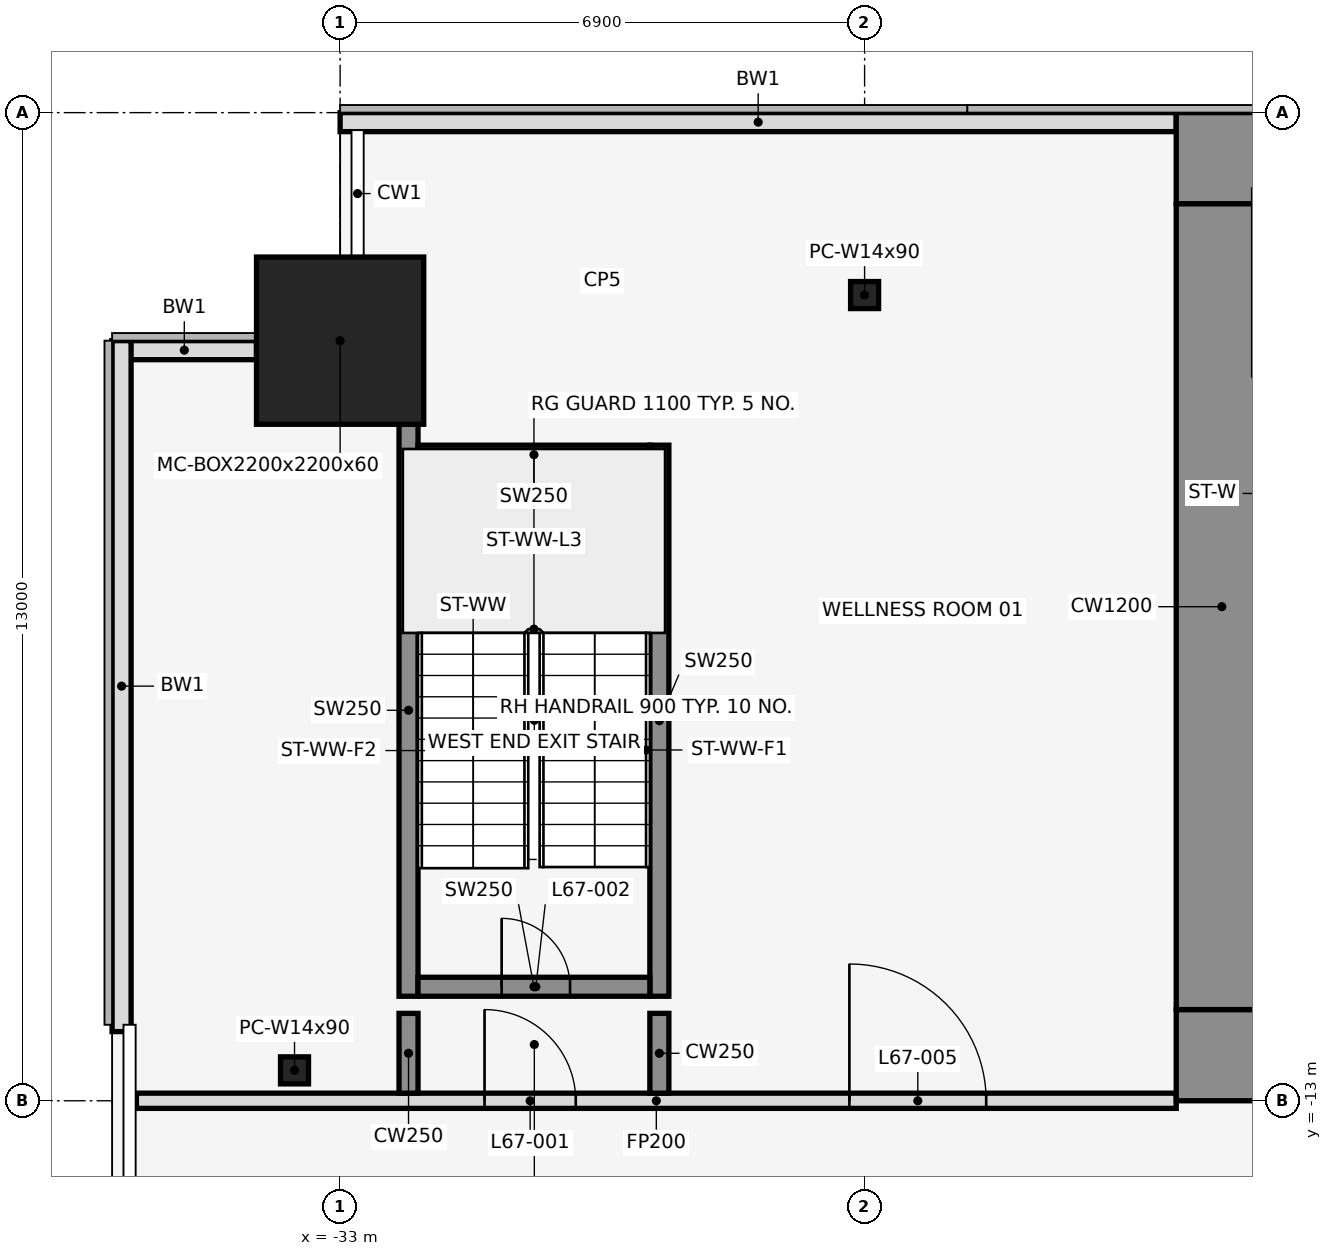
"""IFC4 building model, lengths in metres.
Left out: names, types, materials, properties, quantities, classifications, styles, units other than length and angle.
Written with IfcOpenShell. Run it as: python <this file> out.ifc"""

import sys

from ifc_helpers import new_model, si_unit, direction, frame, frame_2d, origin, origin_2d, place, context, subcontext, project, spatial, rectangle, hollow_rectangle, i_section, extrude, element, fill, save


model = new_model("IFC4")
c1 = context("Model", 3, precision=1e-05, world=origin(), true_north=direction((0.0, 1.0)))
c2 = subcontext(c1, "Body", "Model", "MODEL_VIEW")
j1 = project(units=[si_unit("LENGTHUNIT", "METRE"), si_unit("PLANEANGLEUNIT", "RADIAN")], contexts=[c1])
p1 = place(None, origin())
s1 = spatial("IfcSite", under=j1, at=p1, CompositionType="ELEMENT")
p2 = place(p1, origin())
s2 = spatial("IfcBuilding", under=s1, at=p2, CompositionType="ELEMENT")
p3 = place(p2, frame((0.0, 0.0, 297.5)))
s3 = spatial("IfcBuildingStorey", under=s2, at=p3, CompositionType="ELEMENT", Elevation=297.5)
p4 = place(p3, frame((-33.0, -3.0, 0.0), z_axis=(0.0, 0.0, 1.0), x_axis=(1.0, 0.0, 0.0)))
e1 = element("IfcColumn", 1, at=p4, inside=s3, PredefinedType="COLUMN", context=c2, shape_type="SweptSolid", body=[
    extrude(hollow_rectangle(XDim=2.2, YDim=2.2, WallThickness=0.06, at=origin_2d()), origin(), (0.0, 0.0, 1.0), 4.5),
])
for number, where, z_axis, x_axis in (
    (2, (-26.1, -2.4, 0.0), (0.0, 0.0, 1.0), (1.0, 0.0, 0.0)),
    (3, (-33.6, -12.6, 0.0), (0.0, 0.0, 1.0), (1.0, 0.0, 0.0)),
):
    element("IfcColumn", number, at=place(p3, frame(where, z_axis=z_axis, x_axis=x_axis)), inside=s3, PredefinedType="COLUMN", context=c2, shape_type="SweptSolid", body=[
        extrude(i_section(OverallWidth=0.368, OverallDepth=0.356, WebThickness=0.011, FlangeThickness=0.018, at=origin_2d()), origin(), (0.0, 0.0, 1.0), 4.5),
    ])
p5 = place(p3, frame((-22.0, -0.125, 0.0), z_axis=(0.0, 0.0, 1.0), x_axis=(-1.0, 0.0, 0.0)))
e4 = element("IfcWall", 4, at=p5, inside=s3, PredefinedType="STANDARD", context=c2, shape_type="SweptSolid", body=[
    extrude(rectangle(XDim=11.0, YDim=0.25, at=frame_2d((5.5, 0.0))), origin(), (0.0, 0.0, 1.0), 4.35),
])
p6 = place(p3, frame((-34.1, -3.125, 0.0), z_axis=(0.0, 0.0, 1.0), x_axis=(-1.0, 0.0, 0.0)))
e5 = element("IfcWall", 5, at=p6, inside=s3, PredefinedType="STANDARD", context=c2, shape_type="SweptSolid", body=[
    extrude(rectangle(XDim=1.9, YDim=0.25, at=frame_2d((0.95, 0.0))), origin(), (0.0, 0.0, 1.0), 4.35),
])
p7 = place(p3, frame((-35.875, -3.0, 0.0), z_axis=(0.0, 0.0, 1.0), x_axis=(0.0, -1.0, 0.0)))
e6 = element("IfcWall", 6, at=p7, inside=s3, PredefinedType="STANDARD", context=c2, shape_type="SweptSolid", body=[
    extrude(rectangle(XDim=9.09, YDim=0.25, at=frame_2d((4.545, 0.0))), origin(), (0.0, 0.0, 1.0), 4.35),
])
p8 = place(p3, frame((-32.1, -11.625, 0.0), z_axis=(0.0, 0.0, 1.0), x_axis=(0.0, 1.0, 0.0)))
e7 = element("IfcWall", 7, at=p8, inside=s3, PredefinedType="SHEAR", context=c2, shape_type="SweptSolid", body=[
    extrude(rectangle(XDim=7.525, YDim=0.25, at=frame_2d((3.762, 0.0))), origin(), (0.0, 0.0, 1.0), 4.5),
])
p9 = place(p3, frame((-28.8, -11.625, 0.0), z_axis=(0.0, 0.0, 1.0), x_axis=(0.0, 1.0, 0.0)))
e8 = element("IfcWall", 8, at=p9, inside=s3, PredefinedType="SHEAR", context=c2, shape_type="SweptSolid", body=[
    extrude(rectangle(XDim=7.25, YDim=0.25, at=frame_2d((3.625, 0.0))), origin(), (0.0, 0.0, 1.0), 4.5),
])
p10 = place(p3, frame((-31.975, -11.5, 0.0), z_axis=(0.0, 0.0, 1.0), x_axis=(1.0, 0.0, 0.0)))
e9 = element("IfcWall", 9, at=p10, inside=s3, PredefinedType="SHEAR", context=c2, shape_type="SweptSolid", body=[
    extrude(rectangle(XDim=3.05, YDim=0.25, at=frame_2d((1.525, 0.0))), origin(), (0.0, 0.0, 1.0), 4.5),
])
p11 = place(p10, frame((1.1, 0.0, 0.0)))
e10 = element("IfcOpeningElement", 10, at=p11, cuts=e9, PredefinedType="OPENING", context=c2, shape_type="SweptSolid", body=[
    extrude(rectangle(XDim=0.9, YDim=2.1, at=frame_2d((0.45, 1.05))), frame((0.0, 0.137, 0.0), z_axis=(0.0, -1.0, 0.0), x_axis=(1.0, 0.0, 0.0)), (0.0, 0.0, 1.0), 0.274),
])
p12 = place(p3, frame((-31.975, -4.5, 0.0), z_axis=(0.0, 0.0, 1.0), x_axis=(1.0, 0.0, 0.0)))
e11 = element("IfcWall", 11, at=p12, inside=s3, PredefinedType="SHEAR", context=c2, shape_type="SweptSolid", body=[
    extrude(rectangle(XDim=3.05, YDim=0.25, at=frame_2d((1.525, 0.0))), origin(), (0.0, 0.0, 1.0), 4.5),
])
p13 = place(p3, frame((-35.68, -13.0, 0.0), z_axis=(0.0, 0.0, 1.0), x_axis=(1.0, 0.0, 0.0)))
e12 = element("IfcWall", 12, at=p13, inside=s3, PredefinedType="PARTITIONING", context=c2, shape_type="SweptSolid", body=[
    extrude(rectangle(XDim=13.68, YDim=0.2, at=frame_2d((6.84, 0.0))), origin(), (0.0, 0.0, 1.0), 3.418),
])
p14 = place(p13, frame((4.58, 0.0, 0.0)))
e13 = element("IfcOpeningElement", 13, at=p14, cuts=e12, PredefinedType="OPENING", context=c2, shape_type="SweptSolid", body=[
    extrude(rectangle(XDim=1.2, YDim=2.1, at=frame_2d((0.6, 1.05))), frame((0.0, 0.112, 0.0), z_axis=(0.0, -1.0, 0.0), x_axis=(1.0, 0.0, 0.0)), (0.0, 0.0, 1.0), 0.224),
])
p15 = place(p13, frame((9.38, 0.0, 0.0)))
e14 = element("IfcOpeningElement", 14, at=p15, cuts=e12, PredefinedType="OPENING", context=c2, shape_type="SweptSolid", body=[
    extrude(rectangle(XDim=1.8, YDim=2.1, at=frame_2d((0.9, 1.05))), frame((0.0, 0.112, 0.0), z_axis=(0.0, -1.0, 0.0), x_axis=(1.0, 0.0, 0.0)), (0.0, 0.0, 1.0), 0.224),
])
for number, where, z_axis, x_axis in (
    (15, (-32.1, -12.9, 0.0), (0.0, 0.0, 1.0), (0.0, 1.0, 0.0)),
    (16, (-28.8, -12.9, 0.0), (0.0, 0.0, 1.0), (0.0, 1.0, 0.0)),
):
    element("IfcWall", number, at=place(p3, frame(where, z_axis=z_axis, x_axis=x_axis)), inside=s3, PredefinedType="SHEAR", context=c2, shape_type="SweptSolid", body=[
        extrude(rectangle(XDim=1.05, YDim=0.25, at=frame_2d((0.525, 0.0))), origin(), (0.0, 0.0, 1.0), 4.5),
    ])
p16 = place(p3, frame((-22.0, -0.6, 0.0), z_axis=(0.0, 0.0, 1.0), x_axis=(1.0, 0.0, 0.0)))
e17 = element("IfcWall", 17, at=p16, inside=s3, PredefinedType="SHEAR", context=c2, shape_type="SweptSolid", body=[
    extrude(rectangle(XDim=44.0, YDim=1.2, at=frame_2d((22.0, 0.0))), origin(), (0.0, 0.0, 1.0), 4.5),
])
p17 = place(p16, frame((18.55, 0.0, 0.0)))
e18 = element("IfcOpeningElement", 18, at=p17, cuts=e17, PredefinedType="OPENING", context=c2, shape_type="SweptSolid", body=[
    extrude(rectangle(XDim=0.9, YDim=2.1, at=frame_2d((0.45, 1.05))), frame((0.0, 0.612, 0.0), z_axis=(0.0, -1.0, 0.0), x_axis=(1.0, 0.0, 0.0)), (0.0, 0.0, 1.0), 1.224),
])
p18 = place(p16, frame((24.55, 0.0, 0.0)))
e19 = element("IfcOpeningElement", 19, at=p18, cuts=e17, PredefinedType="OPENING", context=c2, shape_type="SweptSolid", body=[
    extrude(rectangle(XDim=0.9, YDim=2.1, at=frame_2d((0.45, 1.05))), frame((0.0, 0.612, 0.0), z_axis=(0.0, -1.0, 0.0), x_axis=(1.0, 0.0, 0.0)), (0.0, 0.0, 1.0), 1.224),
])
p19 = place(p3, frame((-22.0, -12.4, 0.0), z_axis=(0.0, 0.0, 1.0), x_axis=(1.0, 0.0, 0.0)))
e20 = element("IfcWall", 20, at=p19, inside=s3, PredefinedType="SHEAR", context=c2, shape_type="SweptSolid", body=[
    extrude(rectangle(XDim=44.0, YDim=1.2, at=frame_2d((22.0, 0.0))), origin(), (0.0, 0.0, 1.0), 4.5),
])
p20 = place(p19, frame((2.2, 0.0, 0.0)))
e21 = element("IfcOpeningElement", 21, at=p20, cuts=e20, PredefinedType="OPENING", context=c2, shape_type="SweptSolid", body=[
    extrude(rectangle(XDim=1.2, YDim=2.1, at=frame_2d((0.6, 1.05))), frame((0.0, 0.612, 0.0), z_axis=(0.0, -1.0, 0.0), x_axis=(1.0, 0.0, 0.0)), (0.0, 0.0, 1.0), 1.224),
])
p21 = place(p19, frame((21.4, 0.0, 0.0)))
e22 = element("IfcOpeningElement", 22, at=p21, cuts=e20, PredefinedType="OPENING", context=c2, shape_type="SweptSolid", body=[
    extrude(rectangle(XDim=1.2, YDim=2.1, at=frame_2d((0.6, 1.05))), frame((0.0, 0.612, 0.0), z_axis=(0.0, -1.0, 0.0), x_axis=(1.0, 0.0, 0.0)), (0.0, 0.0, 1.0), 1.224),
])
p22 = place(p19, frame((40.6, 0.0, 0.0)))
e23 = element("IfcOpeningElement", 23, at=p22, cuts=e20, PredefinedType="OPENING", context=c2, shape_type="SweptSolid", body=[
    extrude(rectangle(XDim=1.2, YDim=2.1, at=frame_2d((0.6, 1.05))), frame((0.0, 0.612, 0.0), z_axis=(0.0, -1.0, 0.0), x_axis=(1.0, 0.0, 0.0)), (0.0, 0.0, 1.0), 1.224),
])
p23 = place(p19, frame((16.0, 0.0, 0.0)))
e24 = element("IfcOpeningElement", 24, at=p23, cuts=e20, PredefinedType="OPENING", context=c2, shape_type="SweptSolid", body=[
    extrude(rectangle(XDim=1.8, YDim=2.1, at=frame_2d((0.9, 1.05))), frame((0.0, 0.612, 0.0), z_axis=(0.0, -1.0, 0.0), x_axis=(1.0, 0.0, 0.0)), (0.0, 0.0, 1.0), 1.224),
])
p24 = place(p19, frame((6.3, 0.0, 0.0)))
e25 = element("IfcOpeningElement", 25, at=p24, cuts=e20, PredefinedType="OPENING", context=c2, shape_type="SweptSolid", body=[
    extrude(rectangle(XDim=1.2, YDim=2.1, at=frame_2d((0.6, 1.05))), frame((0.0, 0.612, 0.0), z_axis=(0.0, -1.0, 0.0), x_axis=(1.0, 0.0, 0.0)), (0.0, 0.0, 1.0), 1.224),
])
p25 = place(p19, frame((26.2, 0.0, 0.0)))
e26 = element("IfcOpeningElement", 26, at=p25, cuts=e20, PredefinedType="OPENING", context=c2, shape_type="SweptSolid", body=[
    extrude(rectangle(XDim=1.8, YDim=2.1, at=frame_2d((0.9, 1.05))), frame((0.0, 0.612, 0.0), z_axis=(0.0, -1.0, 0.0), x_axis=(1.0, 0.0, 0.0)), (0.0, 0.0, 1.0), 1.224),
])
p26 = place(p19, frame((36.5, 0.0, 0.0)))
e27 = element("IfcOpeningElement", 27, at=p26, cuts=e20, PredefinedType="OPENING", context=c2, shape_type="SweptSolid", body=[
    extrude(rectangle(XDim=1.2, YDim=2.1, at=frame_2d((0.6, 1.05))), frame((0.0, 0.612, 0.0), z_axis=(0.0, -1.0, 0.0), x_axis=(1.0, 0.0, 0.0)), (0.0, 0.0, 1.0), 1.224),
])
p27 = place(p3, frame((-21.4, -11.8, 0.0), z_axis=(0.0, 0.0, 1.0), x_axis=(0.0, 1.0, 0.0)))
e28 = element("IfcWall", 28, at=p27, inside=s3, PredefinedType="SHEAR", context=c2, shape_type="SweptSolid", body=[
    extrude(rectangle(XDim=10.6, YDim=1.2, at=frame_2d((5.3, 0.0))), origin(), (0.0, 0.0, 1.0), 4.5),
])
p28 = place(p14, origin())
e29 = element("IfcDoor", 29, at=p28, inside=s3, OperationType="SINGLE_SWING_LEFT", PredefinedType="DOOR", context=c2, shape_type="SweptSolid", body=[
    extrude(rectangle(XDim=1.2, YDim=2.1, at=frame_2d((0.6, 1.05))), frame((0.0, 0.025, 0.0), z_axis=(0.0, -1.0, 0.0), x_axis=(1.0, 0.0, 0.0)), (0.0, 0.0, 1.0), 0.05),
])
fill(e13, e29)
p29 = place(p11, origin())
e30 = element("IfcDoor", 30, at=p29, inside=s3, OperationType="SINGLE_SWING_LEFT", PredefinedType="DOOR", context=c2, shape_type="SweptSolid", body=[
    extrude(rectangle(XDim=0.9, YDim=2.1, at=frame_2d((0.45, 1.05))), frame((0.0, 0.025, 0.0), z_axis=(0.0, -1.0, 0.0), x_axis=(1.0, 0.0, 0.0)), (0.0, 0.0, 1.0), 0.05),
])
fill(e10, e30)
p30 = place(p15, origin())
e31 = element("IfcDoor", 31, at=p30, inside=s3, OperationType="SINGLE_SWING_LEFT", PredefinedType="DOOR", context=c2, shape_type="SweptSolid", body=[
    extrude(rectangle(XDim=1.8, YDim=2.1, at=frame_2d((0.9, 1.05))), frame((0.0, 0.025, 0.0), z_axis=(0.0, -1.0, 0.0), x_axis=(1.0, 0.0, 0.0)), (0.0, 0.0, 1.0), 0.05),
])
fill(e14, e31)
save(model, sys.argv[1])
